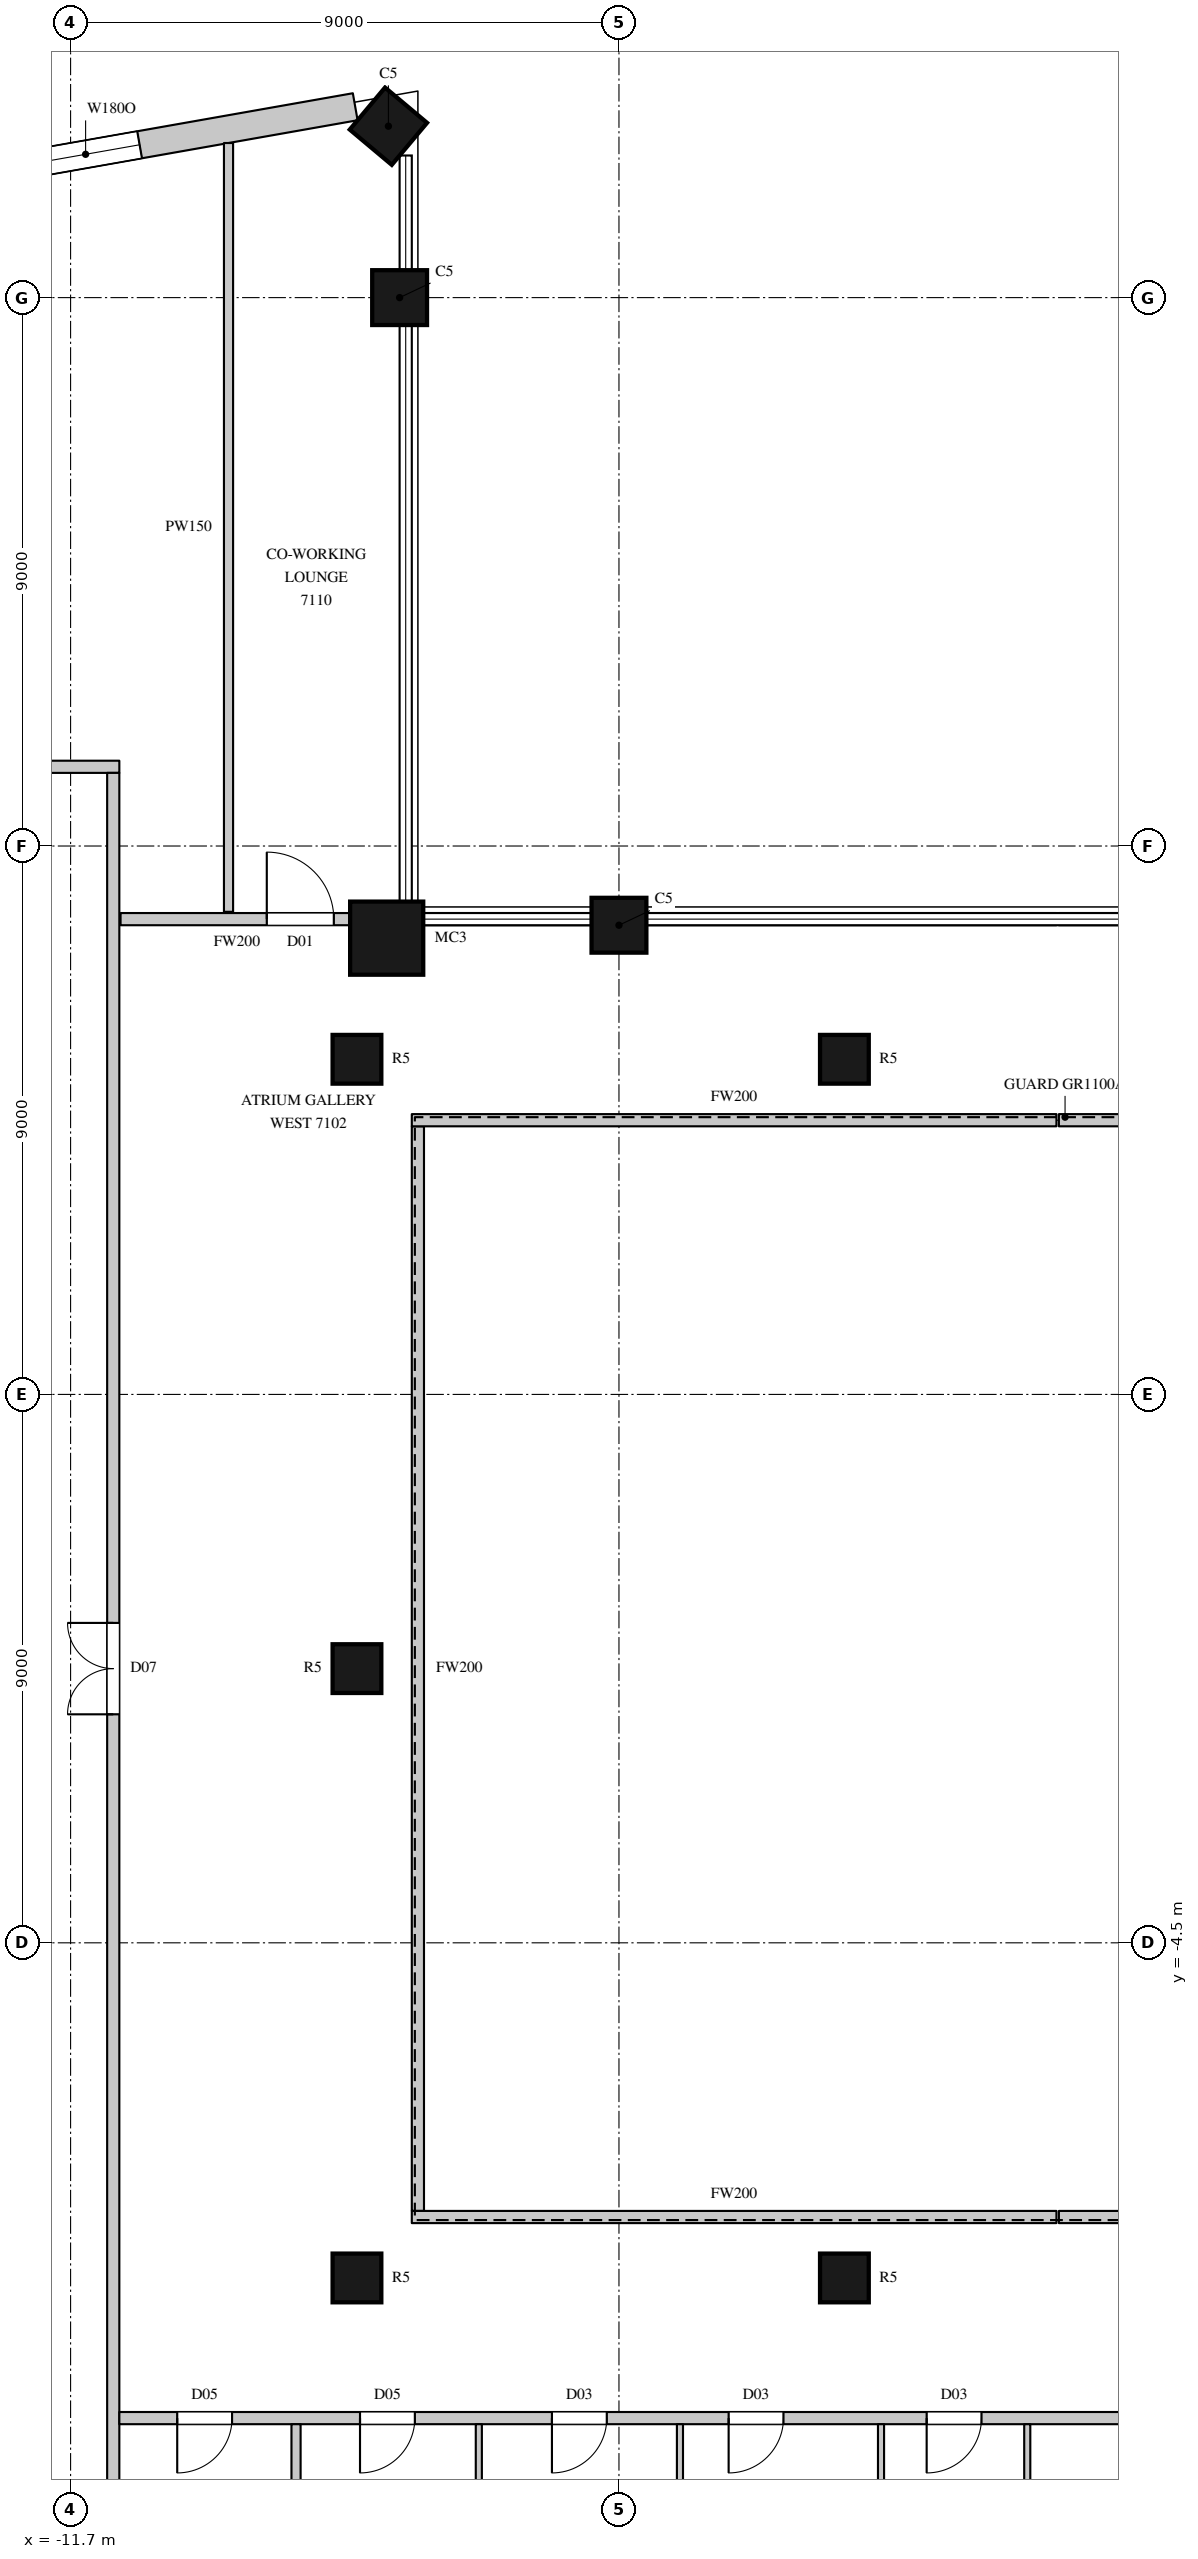
"""IFC4 building model, lengths in metres.
Left out: names, types, materials, properties, quantities, classifications, styles, units other than length and angle.
Written with IfcOpenShell. Run it as: python <this file> out.ifc"""

import sys

from ifc_helpers import new_model, si_unit, direction, frame, frame_2d, origin, origin_2d, place, context, subcontext, project, spatial, rectangle, circle, extrude, element, fill, save


model = new_model("IFC4")
c1 = context("Model", 3, precision=1e-05, world=origin(), true_north=direction((0.0, 1.0)))
c2 = subcontext(c1, "Body", "Model", "MODEL_VIEW")
j1 = project(units=[si_unit("LENGTHUNIT", "METRE"), si_unit("PLANEANGLEUNIT", "RADIAN")], contexts=[c1])
p1 = place(None, origin())
s1 = spatial("IfcSite", under=j1, at=p1, CompositionType="ELEMENT")
p2 = place(p1, origin())
s2 = spatial("IfcBuilding", under=s1, at=p2, CompositionType="ELEMENT")
p3 = place(p2, frame((0.0, 0.0, 313.1)))
s3 = spatial("IfcBuildingStorey", under=s2, at=p3, CompositionType="ELEMENT", Elevation=313.1)
p4 = place(p3, frame((-2.7, 12.2, 0.0), z_axis=(0.0, 0.0, 1.0), x_axis=(-1.0, 0.0, 0.0)))
e1 = element("IfcColumn", 1, at=p4, inside=s3, PredefinedType="COLUMN", context=c2, shape_type="SweptSolid", body=[
    extrude(rectangle(XDim=0.9, YDim=0.9, at=origin_2d()), origin(), (0.0, 0.0, 1.0), 4.1),
])
p5 = place(p3, frame((-6.512, 11.988, 0.0), z_axis=(0.0, 0.0, 1.0), x_axis=(1.0, 0.0, 0.0)))
e2 = element("IfcColumn", 2, at=p5, inside=s3, PredefinedType="COLUMN", context=c2, shape_type="SweptSolid", body=[
    extrude(circle(Radius=0.6, at=origin_2d()), origin(), (0.0, 0.0, 1.0), 4.1),
])
for number, where, z_axis, x_axis in (
    (3, (-6.3, 22.5, 0.0), (0.0, 0.0, 1.0), (0.0, 1.0, 0.0)),
    (4, (-6.484, 25.313, 0.0), (0.0, 0.0, 1.0), (-0.766, 0.643, 0.0)),
):
    element("IfcColumn", number, at=place(p3, frame(where, z_axis=z_axis, x_axis=x_axis)), inside=s3, PredefinedType="COLUMN", context=c2, shape_type="SweptSolid", body=[
        extrude(rectangle(XDim=0.9, YDim=0.9, at=origin_2d()), origin(), (0.0, 0.0, 1.0), 4.1),
    ])
for number, where, z_axis, x_axis in (
    (5, (-7.0, -10.0, 0.0), (0.0, 0.0, 1.0), (1.0, 0.0, 0.0)),
    (6, (-7.0, 0.0, 0.0), (0.0, 0.0, 1.0), (1.0, 0.0, 0.0)),
    (7, (-7.0, 10.0, 0.0), (0.0, 0.0, 1.0), (1.0, 0.0, 0.0)),
    (8, (1.0, -10.0, 0.0), (0.0, 0.0, 1.0), (1.0, 0.0, 0.0)),
    (9, (1.0, 10.0, 0.0), (0.0, 0.0, 1.0), (1.0, 0.0, 0.0)),
):
    element("IfcColumn", number, at=place(p3, frame(where, z_axis=z_axis, x_axis=x_axis)), inside=s3, PredefinedType="COLUMN", context=c2, shape_type="SweptSolid", body=[
        extrude(circle(Radius=0.4, at=origin_2d()), origin(), (0.0, 0.0, 1.0), 4.1),
    ])
p6 = place(p3, frame((-7.029, 25.632, 0.0), z_axis=(0.0, 0.0, 1.0), x_axis=(-0.984797606634, -0.173705710808, 0.0)))
e10 = element("IfcWall", 10, at=p6, inside=s3, PredefinedType="SOLIDWALL", context=c2, shape_type="SweptSolid", body=[
    extrude(rectangle(XDim=5.772, YDim=0.45, at=frame_2d((2.886, 0.0))), origin(), (0.0, 0.0, 1.0), 3.8),
])
p7 = place(p6, frame((3.593, 0.0, 1.05)))
e11 = element("IfcOpeningElement", 11, at=p7, cuts=e10, PredefinedType="OPENING", context=c2, shape_type="SweptSolid", body=[
    extrude(rectangle(XDim=1.8, YDim=2.4, at=frame_2d((0.9, 1.2))), frame((0.0, 0.235, 0.0), z_axis=(0.0, -1.0, 0.0), x_axis=(1.0, 0.0, 0.0)), (0.0, 0.0, 1.0), 0.47),
])
p8 = place(p3, frame((-13.97, 14.8, 0.0), z_axis=(0.0, 0.0, 1.0), x_axis=(1.0, 0.0, 0.0)))
e12 = element("IfcWall", 12, at=p8, inside=s3, PredefinedType="PARTITIONING", context=c2, shape_type="SweptSolid", body=[
    extrude(rectangle(XDim=3.07, YDim=0.2, at=frame_2d((1.535, 0.0))), origin(), (0.0, 0.0, 1.0), 3.8),
])
p9 = place(p3, frame((-11.0, -14.8, 0.0), z_axis=(0.0, 0.0, 1.0), x_axis=(0.0, 1.0, 0.0)))
e13 = element("IfcWall", 13, at=p9, inside=s3, PredefinedType="PARTITIONING", context=c2, shape_type="SweptSolid", body=[
    extrude(rectangle(XDim=29.5, YDim=0.2, at=frame_2d((14.75, 0.0))), origin(), (0.0, 0.0, 1.0), 3.8),
])
p10 = place(p9, frame((14.05, 0.0, 0.0)))
e14 = element("IfcOpeningElement", 14, at=p10, cuts=e13, PredefinedType="OPENING", context=c2, shape_type="SweptSolid", body=[
    extrude(rectangle(XDim=1.5, YDim=2.4, at=frame_2d((0.75, 1.2))), frame((0.0, 0.11, 0.0), z_axis=(0.0, -1.0, 0.0), x_axis=(1.0, 0.0, 0.0)), (0.0, 0.0, 1.0), 0.22),
])
p11 = place(p3, frame((-10.9, -12.3, 0.0), z_axis=(0.0, 0.0, 1.0), x_axis=(1.0, 0.0, 0.0)))
e15 = element("IfcWall", 15, at=p11, inside=s3, PredefinedType="PARTITIONING", context=c2, shape_type="SweptSolid", body=[
    extrude(rectangle(XDim=22.1, YDim=0.2, at=frame_2d((11.05, 0.0))), origin(), (0.0, 0.0, 1.0), 3.8),
])
p12 = place(p11, frame((0.95, 0.0, 0.0)))
e16 = element("IfcOpeningElement", 16, at=p12, cuts=e15, PredefinedType="OPENING", context=c2, shape_type="SweptSolid", body=[
    extrude(rectangle(XDim=0.9, YDim=2.2, at=frame_2d((0.45, 1.1))), frame((0.0, 0.11, 0.0), z_axis=(0.0, -1.0, 0.0), x_axis=(1.0, 0.0, 0.0)), (0.0, 0.0, 1.0), 0.22),
])
p13 = place(p11, frame((3.95, 0.0, 0.0)))
e17 = element("IfcOpeningElement", 17, at=p13, cuts=e15, PredefinedType="OPENING", context=c2, shape_type="SweptSolid", body=[
    extrude(rectangle(XDim=0.9, YDim=2.2, at=frame_2d((0.45, 1.1))), frame((0.0, 0.11, 0.0), z_axis=(0.0, -1.0, 0.0), x_axis=(1.0, 0.0, 0.0)), (0.0, 0.0, 1.0), 0.22),
])
p14 = place(p11, frame((7.1, 0.0, 0.0)))
e18 = element("IfcOpeningElement", 18, at=p14, cuts=e15, PredefinedType="OPENING", context=c2, shape_type="SweptSolid", body=[
    extrude(rectangle(XDim=0.9, YDim=2.2, at=frame_2d((0.45, 1.1))), frame((0.0, 0.11, 0.0), z_axis=(0.0, -1.0, 0.0), x_axis=(1.0, 0.0, 0.0)), (0.0, 0.0, 1.0), 0.22),
])
p15 = place(p11, frame((10.0, 0.0, 0.0)))
e19 = element("IfcOpeningElement", 19, at=p15, cuts=e15, PredefinedType="OPENING", context=c2, shape_type="SweptSolid", body=[
    extrude(rectangle(XDim=0.9, YDim=2.2, at=frame_2d((0.45, 1.1))), frame((0.0, 0.11, 0.0), z_axis=(0.0, -1.0, 0.0), x_axis=(1.0, 0.0, 0.0)), (0.0, 0.0, 1.0), 0.22),
])
p16 = place(p11, frame((13.25, 0.0, 0.0)))
e20 = element("IfcOpeningElement", 20, at=p16, cuts=e15, PredefinedType="OPENING", context=c2, shape_type="SweptSolid", body=[
    extrude(rectangle(XDim=0.9, YDim=2.2, at=frame_2d((0.45, 1.1))), frame((0.0, 0.11, 0.0), z_axis=(0.0, -1.0, 0.0), x_axis=(1.0, 0.0, 0.0)), (0.0, 0.0, 1.0), 0.22),
])
p17 = place(p11, frame((16.85, 0.0, 0.0)))
e21 = element("IfcOpeningElement", 21, at=p17, cuts=e15, PredefinedType="OPENING", context=c2, shape_type="SweptSolid", body=[
    extrude(rectangle(XDim=1.1, YDim=2.4, at=frame_2d((0.55, 1.2))), frame((0.0, 0.11, 0.0), z_axis=(0.0, -1.0, 0.0), x_axis=(1.0, 0.0, 0.0)), (0.0, 0.0, 1.0), 0.22),
])
p18 = place(p3, frame((-10.88, 12.3, 0.0), z_axis=(0.0, 0.0, 1.0), x_axis=(1.0, 0.0, 0.0)))
e22 = element("IfcWall", 22, at=p18, inside=s3, PredefinedType="PARTITIONING", context=c2, shape_type="SweptSolid", body=[
    extrude(rectangle(XDim=3.818, YDim=0.2, at=frame_2d((1.909, 0.0))), origin(), (0.0, 0.0, 1.0), 3.8),
])
p19 = place(p18, frame((2.4, 0.0, 0.0)))
e23 = element("IfcOpeningElement", 23, at=p19, cuts=e22, PredefinedType="OPENING", context=c2, shape_type="SweptSolid", body=[
    extrude(rectangle(XDim=1.1, YDim=2.4, at=frame_2d((0.55, 1.2))), frame((0.0, 0.11, 0.0), z_axis=(0.0, -1.0, 0.0), x_axis=(1.0, 0.0, 0.0)), (0.0, 0.0, 1.0), 0.22),
])
p20 = place(p3, frame((-5.962, 12.3, 0.0), z_axis=(0.0, 0.0, 1.0), x_axis=(1.0, 0.0, 0.0)))
e24 = element("IfcWall", 24, at=p20, inside=s3, PredefinedType="PARTITIONING", context=c2, shape_type="SweptSolid", body=[
    extrude(rectangle(XDim=2.812, YDim=0.2, at=frame_2d((1.406, 0.0))), origin(), (0.0, 0.0, 1.0), 3.8),
])
p21 = place(p3, frame((-2.25, 12.3, 0.0), z_axis=(0.0, 0.0, 1.0), x_axis=(1.0, 0.0, 0.0)))
e25 = element("IfcWall", 25, at=p21, inside=s3, PredefinedType="PARTITIONING", context=c2, shape_type="SweptSolid", body=[
    extrude(rectangle(XDim=6.73, YDim=0.2, at=frame_2d((3.365, 0.0))), origin(), (0.0, 0.0, 1.0), 3.8),
])
p22 = place(p3, frame((-6.0, -8.9, 0.0), z_axis=(0.0, 0.0, 1.0), x_axis=(0.0, 1.0, 0.0)))
e26 = element("IfcWall", 26, at=p22, inside=s3, PredefinedType="PARTITIONING", context=c2, shape_type="SweptSolid", body=[
    extrude(rectangle(XDim=17.8, YDim=0.2, at=frame_2d((8.9, 0.0))), origin(), (0.0, 0.0, 1.0), 3.8),
])
for number, where, z_axis, x_axis in (
    (27, (-6.1, -9.0, 0.0), (0.0, 0.0, 1.0), (1.0, 0.0, 0.0)),
    (28, (-6.1, 9.0, 0.0), (0.0, 0.0, 1.0), (1.0, 0.0, 0.0)),
):
    element("IfcWall", number, at=place(p3, frame(where, z_axis=z_axis, x_axis=x_axis)), inside=s3, PredefinedType="PARTITIONING", context=c2, shape_type="SweptSolid", body=[
        extrude(rectangle(XDim=10.58, YDim=0.2, at=frame_2d((5.29, 0.0))), origin(), (0.0, 0.0, 1.0), 3.8),
    ])
for number, where, z_axis, x_axis in (
    (29, (4.52, -9.0, 0.0), (0.0, 0.0, 1.0), (1.0, 0.0, 0.0)),
    (30, (4.52, 9.0, 0.0), (0.0, 0.0, 1.0), (1.0, 0.0, 0.0)),
):
    element("IfcWall", number, at=place(p3, frame(where, z_axis=z_axis, x_axis=x_axis)), inside=s3, PredefinedType="PARTITIONING", context=c2, shape_type="SweptSolid", body=[
        extrude(rectangle(XDim=3.58, YDim=0.2, at=frame_2d((1.79, 0.0))), origin(), (0.0, 0.0, 1.0), 3.8),
    ])
p23 = place(p3, frame((4.52, 12.3, 0.0), z_axis=(0.0, 0.0, 1.0), x_axis=(1.0, 0.0, 0.0)))
e31 = element("IfcWall", 31, at=p23, inside=s3, PredefinedType="PARTITIONING", context=c2, shape_type="SweptSolid", body=[
    extrude(rectangle(XDim=1.33, YDim=0.2, at=frame_2d((0.665, 0.0))), origin(), (0.0, 0.0, 1.0), 3.8),
])
p24 = place(p3, frame((-9.108, 12.42, 0.0), z_axis=(0.0, 0.0, 1.0), x_axis=(0.0, 1.0, 0.0)))
e32 = element("IfcWall", 32, at=p24, inside=s3, PredefinedType="PARTITIONING", context=c2, shape_type="SweptSolid", body=[
    extrude(rectangle(XDim=12.617, YDim=0.15, at=frame_2d((6.309, 0.0))), origin(), (0.0, 0.0, 1.0), 3.8),
])
p25 = place(p3, frame((-8.0, -24.04, 0.0), z_axis=(0.0, 0.0, 1.0), x_axis=(0.0, 1.0, 0.0)))
e33 = element("IfcWall", 33, at=p25, inside=s3, PredefinedType="PARTITIONING", context=c2, shape_type="SweptSolid", body=[
    extrude(rectangle(XDim=11.64, YDim=0.15, at=frame_2d((5.82, 0.0))), origin(), (0.0, 0.0, 1.0), 3.8),
])
p26 = place(p3, frame((-5.0, -24.04, 0.0), z_axis=(0.0, 0.0, 1.0), x_axis=(0.0, 1.0, 0.0)))
e34 = element("IfcWall", 34, at=p26, inside=s3, PredefinedType="PARTITIONING", context=c2, shape_type="SweptSolid", body=[
    extrude(rectangle(XDim=11.64, YDim=0.1, at=frame_2d((5.82, 0.0))), origin(), (0.0, 0.0, 1.0), 3.8),
])
p27 = place(p3, frame((-1.699, -23.522, 0.0), z_axis=(0.0, 0.0, 1.0), x_axis=(0.0, 1.0, 0.0)))
e35 = element("IfcWall", 35, at=p27, inside=s3, PredefinedType="PARTITIONING", context=c2, shape_type="SweptSolid", body=[
    extrude(rectangle(XDim=11.122, YDim=0.1, at=frame_2d((5.561, 0.0))), origin(), (0.0, 0.0, 1.0), 3.8),
])
p28 = place(p3, frame((1.601, -23.412, 0.0), z_axis=(0.0, 0.0, 1.0), x_axis=(0.0, 1.0, 0.0)))
e36 = element("IfcWall", 36, at=p28, inside=s3, PredefinedType="PARTITIONING", context=c2, shape_type="SweptSolid", body=[
    extrude(rectangle(XDim=11.012, YDim=0.1, at=frame_2d((5.506, 0.0))), origin(), (0.0, 0.0, 1.0), 3.8),
])
p29 = place(p3, frame((4.001, -22.999, 0.0), z_axis=(0.0, 0.0, 1.0), x_axis=(0.0, 1.0, 0.0)))
e37 = element("IfcWall", 37, at=p29, inside=s3, PredefinedType="PARTITIONING", context=c2, shape_type="SweptSolid", body=[
    extrude(rectangle(XDim=10.599, YDim=0.1, at=frame_2d((5.3, 0.0))), origin(), (0.0, 0.0, 1.0), 3.8),
])
p30 = place(p7, origin())
e38 = element("IfcWindow", 38, at=p30, inside=s3, PartitioningType="SINGLE_PANEL", PredefinedType="WINDOW", context=c2, shape_type="SweptSolid", body=[
    extrude(rectangle(XDim=1.8, YDim=2.4, at=frame_2d((0.9, 1.2))), frame((0.0, 0.135, 0.0), z_axis=(0.0, -1.0, 0.0), x_axis=(1.0, 0.0, 0.0)), (0.0, 0.0, 1.0), 0.06),
])
fill(e11, e38)
p31 = place(p10, origin())
e39 = element("IfcDoor", 39, at=p31, inside=s3, OperationType="DOUBLE_DOOR_SINGLE_SWING", PredefinedType="DOOR", context=c2, shape_type="SweptSolid", body=[
    extrude(rectangle(XDim=1.5, YDim=2.4, at=frame_2d((0.75, 1.2))), frame((0.0, 0.025, 0.0), z_axis=(0.0, -1.0, 0.0), x_axis=(1.0, 0.0, 0.0)), (0.0, 0.0, 1.0), 0.05),
])
fill(e14, e39)
p32 = place(p12, origin())
e40 = element("IfcDoor", 40, at=p32, inside=s3, OperationType="SINGLE_SWING_RIGHT", PredefinedType="DOOR", context=c2, shape_type="SweptSolid", body=[
    extrude(rectangle(XDim=0.9, YDim=2.2, at=frame_2d((0.45, 1.1))), frame((0.0, 0.025, 0.0), z_axis=(0.0, -1.0, 0.0), x_axis=(1.0, 0.0, 0.0)), (0.0, 0.0, 1.0), 0.05),
])
fill(e16, e40)
p33 = place(p13, origin())
e41 = element("IfcDoor", 41, at=p33, inside=s3, OperationType="SINGLE_SWING_RIGHT", PredefinedType="DOOR", context=c2, shape_type="SweptSolid", body=[
    extrude(rectangle(XDim=0.9, YDim=2.2, at=frame_2d((0.45, 1.1))), frame((0.0, 0.025, 0.0), z_axis=(0.0, -1.0, 0.0), x_axis=(1.0, 0.0, 0.0)), (0.0, 0.0, 1.0), 0.05),
])
fill(e17, e41)
p34 = place(p14, origin())
e42 = element("IfcDoor", 42, at=p34, inside=s3, OperationType="SINGLE_SWING_RIGHT", PredefinedType="DOOR", context=c2, shape_type="SweptSolid", body=[
    extrude(rectangle(XDim=0.9, YDim=2.2, at=frame_2d((0.45, 1.1))), frame((0.0, 0.025, 0.0), z_axis=(0.0, -1.0, 0.0), x_axis=(1.0, 0.0, 0.0)), (0.0, 0.0, 1.0), 0.05),
])
fill(e18, e42)
p35 = place(p15, origin())
e43 = element("IfcDoor", 43, at=p35, inside=s3, OperationType="SINGLE_SWING_RIGHT", PredefinedType="DOOR", context=c2, shape_type="SweptSolid", body=[
    extrude(rectangle(XDim=0.9, YDim=2.2, at=frame_2d((0.45, 1.1))), frame((0.0, 0.025, 0.0), z_axis=(0.0, -1.0, 0.0), x_axis=(1.0, 0.0, 0.0)), (0.0, 0.0, 1.0), 0.05),
])
fill(e19, e43)
p36 = place(p16, origin())
e44 = element("IfcDoor", 44, at=p36, inside=s3, OperationType="SINGLE_SWING_RIGHT", PredefinedType="DOOR", context=c2, shape_type="SweptSolid", body=[
    extrude(rectangle(XDim=0.9, YDim=2.2, at=frame_2d((0.45, 1.1))), frame((0.0, 0.025, 0.0), z_axis=(0.0, -1.0, 0.0), x_axis=(1.0, 0.0, 0.0)), (0.0, 0.0, 1.0), 0.05),
])
fill(e20, e44)
p37 = place(p19, origin())
e45 = element("IfcDoor", 45, at=p37, inside=s3, OperationType="SINGLE_SWING_LEFT", PredefinedType="DOOR", context=c2, shape_type="SweptSolid", body=[
    extrude(rectangle(XDim=1.1, YDim=2.4, at=frame_2d((0.55, 1.2))), frame((0.0, 0.025, 0.0), z_axis=(0.0, -1.0, 0.0), x_axis=(1.0, 0.0, 0.0)), (0.0, 0.0, 1.0), 0.05),
])
fill(e23, e45)
save(model, sys.argv[1])
